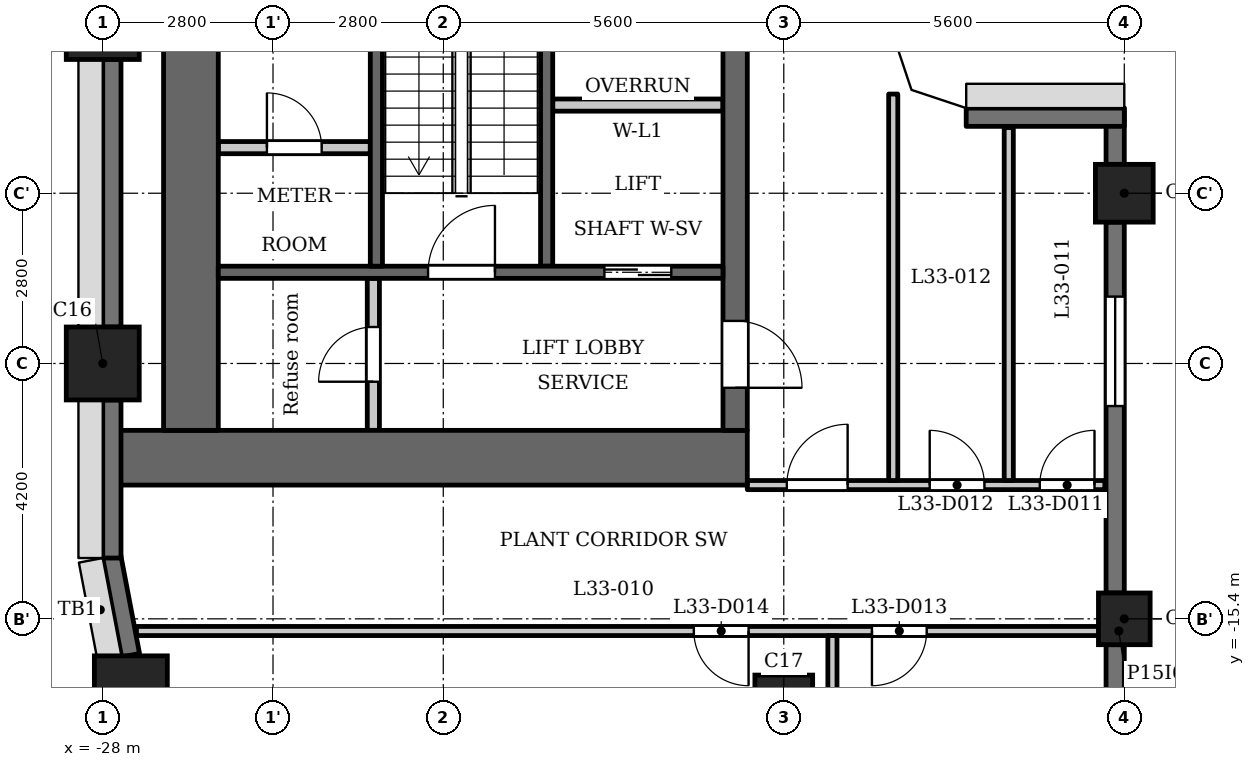
"""IFC4 building model, lengths in metres.
Left out: names, types, materials, properties, quantities, classifications, styles, units other than length and angle.
Written with IfcOpenShell. Run it as: python <this file> out.ifc"""

import sys

from ifc_helpers import new_model, si_unit, direction, frame, frame_2d, origin, origin_2d, place, context, subcontext, project, spatial, polyline, rectangle, outline, extrude, element, fill, save


model = new_model("IFC4")
c1 = context("Model", 3, precision=1e-05, world=origin(), true_north=direction((0.0, 1.0)))
c2 = subcontext(c1, "Body", "Model", "MODEL_VIEW")
j1 = project(units=[si_unit("LENGTHUNIT", "METRE"), si_unit("PLANEANGLEUNIT", "RADIAN")], contexts=[c1])
p1 = place(None, origin())
s1 = spatial("IfcSite", under=j1, at=p1, CompositionType="ELEMENT")
p2 = place(p1, origin())
s2 = spatial("IfcBuilding", under=s1, at=p2, CompositionType="ELEMENT")
p3 = place(p2, frame((0.0, 0.0, 130.7)))
s3 = spatial("IfcBuildingStorey", under=s2, at=p3, CompositionType="ELEMENT", Elevation=130.7)
for number, where, z_axis, x_axis in (
    (1, (-28.0, -5.6, 0.0), (0.0, 0.0, 1.0), (1.0, 0.0, 0.0)),
    (2, (-28.0, -11.2, 0.0), (0.0, 0.0, 1.0), (1.0, 0.0, 0.0)),
    (3, (-27.538, -16.609, 0.0), (0.0, 0.0, 1.0), (1.0, 0.0, 0.0)),
):
    element("IfcColumn", number, at=place(p3, frame(where, z_axis=z_axis, x_axis=x_axis)), inside=s3, PredefinedType="COLUMN", context=c2, shape_type="SweptSolid", body=[
        extrude(rectangle(XDim=1.2, YDim=1.2, at=origin_2d()), origin(), (0.0, 0.0, 1.0), 5.4),
    ])
for number, where, z_axis, x_axis in (
    (4, (-16.8, -16.8, 0.0), (0.0, 0.0, 1.0), (1.0, 0.0, 0.0)),
    (5, (-11.2, -8.4, 0.0), (0.0, 0.0, 1.0), (1.0, 0.0, 0.0)),
):
    element("IfcColumn", number, at=place(p3, frame(where, z_axis=z_axis, x_axis=x_axis)), inside=s3, PredefinedType="COLUMN", context=c2, shape_type="SweptSolid", body=[
        extrude(rectangle(XDim=0.95, YDim=0.95, at=origin_2d()), origin(), (0.0, 0.0, 1.0), 5.4),
    ])
p4 = place(p3, frame((-11.2, -15.4, 0.0), z_axis=(0.0, 0.0, 1.0), x_axis=(1.0, 0.0, 0.0)))
e6 = element("IfcColumn", 6, at=p4, inside=s3, PredefinedType="COLUMN", context=c2, shape_type="SweptSolid", body=[
    extrude(rectangle(XDim=0.85, YDim=0.85, at=origin_2d()), origin(), (0.0, 0.0, 1.0), 5.4),
])
p5 = place(p3, frame((-27.853, -14.372, 0.0), z_axis=(0.0, 0.0, 1.0), x_axis=(0.187349172861, -0.982293381546, 0.0)))
e7 = element("IfcWall", 7, at=p5, inside=s3, PredefinedType="SOLIDWALL", context=c2, shape_type="SweptSolid", body=[
    extrude(rectangle(XDim=1.656, YDim=0.3, at=frame_2d((0.828, 0.0))), origin(), (0.0, 0.0, 1.0), 4.3),
])
p6 = place(p3, frame((-11.35, -21.8, 0.0), z_axis=(0.0, 0.0, 1.0), x_axis=(0.0, 1.0, 0.0)))
e8 = element("IfcWall", 8, at=p6, inside=s3, PredefinedType="SOLIDWALL", context=c2, shape_type="SweptSolid", body=[
    extrude(rectangle(XDim=5.975, YDim=0.3, at=frame_2d((2.988, 0.0))), origin(), (0.0, 0.0, 1.0), 5.1),
])
p7 = place(p6, frame((2.087, 0.0, 0.9)))
e9 = element("IfcOpeningElement", 9, at=p7, cuts=e8, PredefinedType="OPENING", context=c2, shape_type="SweptSolid", body=[
    extrude(rectangle(XDim=1.8, YDim=1.5, at=frame_2d((0.9, 0.75))), frame((0.0, 0.16, 0.0), z_axis=(0.0, -1.0, 0.0), x_axis=(1.0, 0.0, 0.0)), (0.0, 0.0, 1.0), 0.32),
])
p8 = place(p3, frame((-11.35, -14.975, 0.0), z_axis=(0.0, 0.0, 1.0), x_axis=(0.0, 1.0, 0.0)))
e10 = element("IfcWall", 10, at=p8, inside=s3, PredefinedType="SOLIDWALL", context=c2, shape_type="SweptSolid", body=[
    extrude(rectangle(XDim=6.1, YDim=0.3, at=frame_2d((3.05, 0.0))), origin(), (0.0, 0.0, 1.0), 5.1),
])
p9 = place(p8, frame((3.075, 0.0, 0.9)))
e11 = element("IfcOpeningElement", 11, at=p9, cuts=e10, PredefinedType="OPENING", context=c2, shape_type="SweptSolid", body=[
    extrude(rectangle(XDim=1.8, YDim=1.5, at=frame_2d((0.9, 0.75))), frame((0.0, 0.16, 0.0), z_axis=(0.0, -1.0, 0.0), x_axis=(1.0, 0.0, 0.0)), (0.0, 0.0, 1.0), 0.32),
])
p10 = place(p3, frame((-11.35, -7.925, 0.0), z_axis=(0.0, 0.0, 1.0), x_axis=(0.0, 1.0, 0.0)))
e12 = element("IfcWall", 12, at=p10, inside=s3, PredefinedType="SOLIDWALL", context=c2, shape_type="SweptSolid", body=[
    extrude(rectangle(XDim=0.925, YDim=0.3, at=frame_2d((0.462, 0.0))), origin(), (0.0, 0.0, 1.0), 5.1),
])
p11 = place(p3, frame((-11.2, -7.15, 0.0), z_axis=(0.0, 0.0, 1.0), x_axis=(-1.0, 0.0, 0.0)))
e13 = element("IfcWall", 13, at=p11, inside=s3, PredefinedType="SOLIDWALL", context=c2, shape_type="SweptSolid", body=[
    extrude(rectangle(XDim=2.6, YDim=0.3, at=frame_2d((1.3, 0.0))), origin(), (0.0, 0.0, 1.0), 5.1),
])
p12 = place(p3, frame((-27.85, -6.2, 0.0), z_axis=(0.0, 0.0, 1.0), x_axis=(0.0, -1.0, 0.0)))
e14 = element("IfcWall", 14, at=p12, inside=s3, PredefinedType="SOLIDWALL", context=c2, shape_type="SweptSolid", body=[
    extrude(rectangle(XDim=4.4, YDim=0.3, at=frame_2d((2.2, 0.0))), origin(), (0.0, 0.0, 1.0), 4.3),
])
p13 = place(p3, frame((-27.85, -11.8, 0.0), z_axis=(0.0, 0.0, 1.0), x_axis=(0.0, -1.0, 0.0)))
e15 = element("IfcWall", 15, at=p13, inside=s3, PredefinedType="SOLIDWALL", context=c2, shape_type="SweptSolid", body=[
    extrude(rectangle(XDim=2.6, YDim=0.3, at=frame_2d((1.3, 0.0))), origin(), (0.0, 0.0, 1.0), 4.3),
])
p14 = place(p3, frame((-20.7, -9.6, 0.0), z_axis=(0.0, 0.0, 1.0), x_axis=(0.0, 1.0, 0.0)))
e16 = element("IfcWall", 16, at=p14, inside=s3, PredefinedType="SHEAR", context=c2, shape_type="SweptSolid", body=[
    extrude(rectangle(XDim=9.75, YDim=0.2, at=frame_2d((4.875, 0.0))), origin(), (0.0, 0.0, 1.0), 5.1),
])
p15 = place(p3, frame((-17.4, -12.75, 0.0), z_axis=(0.0, 0.0, 1.0), x_axis=(-1.0, 0.0, 0.0)))
e17 = element("IfcWall", 17, at=p15, inside=s3, PredefinedType="SHEAR", context=c2, shape_type="SweptSolid", body=[
    extrude(rectangle(XDim=10.4, YDim=0.9, at=frame_2d((5.2, 0.0))), origin(), (0.0, 0.0, 1.0), 5.1),
])
p16 = place(p3, frame((-17.6, -12.3, 0.0), z_axis=(0.0, 0.0, 1.0), x_axis=(0.0, 1.0, 0.0)))
e18 = element("IfcWall", 18, at=p16, inside=s3, PredefinedType="SHEAR", context=c2, shape_type="SweptSolid", body=[
    extrude(rectangle(XDim=24.6, YDim=0.4, at=frame_2d((12.3, 0.0))), origin(), (0.0, 0.0, 1.0), 5.1),
])
p17 = place(p16, frame((15.45, 0.0, 0.0)))
e19 = element("IfcOpeningElement", 19, at=p17, cuts=e18, PredefinedType="OPENING", context=c2, shape_type="SweptSolid", body=[
    extrude(rectangle(XDim=1.1, YDim=2.1, at=frame_2d((0.55, 1.05))), frame((0.0, 0.21, 0.0), z_axis=(0.0, -1.0, 0.0), x_axis=(1.0, 0.0, 0.0)), (0.0, 0.0, 1.0), 0.42),
])
p18 = place(p16, frame((17.85, 0.0, 0.0)))
e20 = element("IfcOpeningElement", 20, at=p18, cuts=e18, PredefinedType="OPENING", context=c2, shape_type="SweptSolid", body=[
    extrude(rectangle(XDim=1.1, YDim=2.1, at=frame_2d((0.55, 1.05))), frame((0.0, 0.21, 0.0), z_axis=(0.0, -1.0, 0.0), x_axis=(1.0, 0.0, 0.0)), (0.0, 0.0, 1.0), 0.42),
])
p19 = place(p16, frame((22.8, 0.0, 0.0)))
e21 = element("IfcOpeningElement", 21, at=p19, cuts=e18, PredefinedType="OPENING", context=c2, shape_type="SweptSolid", body=[
    extrude(rectangle(XDim=1.1, YDim=2.1, at=frame_2d((0.55, 1.05))), frame((0.0, 0.21, 0.0), z_axis=(0.0, -1.0, 0.0), x_axis=(1.0, 0.0, 0.0)), (0.0, 0.0, 1.0), 0.42),
])
p20 = place(p16, frame((0.7, 0.0, 0.0)))
e22 = element("IfcOpeningElement", 22, at=p20, cuts=e18, PredefinedType="OPENING", context=c2, shape_type="SweptSolid", body=[
    extrude(rectangle(XDim=1.1, YDim=2.1, at=frame_2d((0.55, 1.05))), frame((0.0, 0.21, 0.0), z_axis=(0.0, -1.0, 0.0), x_axis=(1.0, 0.0, 0.0)), (0.0, 0.0, 1.0), 0.42),
])
p21 = place(p16, frame((12.775, 0.0, 0.0)))
e23 = element("IfcOpeningElement", 23, at=p21, cuts=e18, PredefinedType="OPENING", context=c2, shape_type="SweptSolid", body=[
    extrude(rectangle(XDim=1.8, YDim=2.1, at=frame_2d((0.9, 1.05))), frame((0.0, 0.21, 0.0), z_axis=(0.0, -1.0, 0.0), x_axis=(1.0, 0.0, 0.0)), (0.0, 0.0, 1.0), 0.42),
])
p22 = place(p3, frame((-26.55, -12.3, 0.0), z_axis=(0.0, 0.0, 1.0), x_axis=(0.0, 1.0, 0.0)))
e24 = element("IfcWall", 24, at=p22, inside=s3, PredefinedType="SHEAR", context=c2, shape_type="SweptSolid", body=[
    extrude(rectangle(XDim=24.6, YDim=0.9, at=frame_2d((12.3, 0.0))), origin(), (0.0, 0.0, 1.0), 5.1),
])
p23 = place(p3, frame((-23.55, -12.3, 0.0), z_axis=(0.0, 0.0, 1.0), x_axis=(0.0, 1.0, 0.0)))
e25 = element("IfcWall", 25, at=p23, inside=s3, PredefinedType="PARTITIONING", context=c2, shape_type="SweptSolid", body=[
    extrude(rectangle(XDim=2.5, YDim=0.2, at=frame_2d((1.25, 0.0))), origin(), (0.0, 0.0, 1.0), 5.1),
])
p24 = place(p23, frame((0.8, 0.0, 0.0)))
e26 = element("IfcOpeningElement", 26, at=p24, cuts=e25, PredefinedType="OPENING", context=c2, shape_type="SweptSolid", body=[
    extrude(rectangle(XDim=0.9, YDim=2.1, at=frame_2d((0.45, 1.05))), frame((0.0, 0.11, 0.0), z_axis=(0.0, -1.0, 0.0), x_axis=(1.0, 0.0, 0.0)), (0.0, 0.0, 1.0), 0.22),
])
p25 = place(p3, frame((-23.6, -7.65, 0.0), z_axis=(0.0, 0.0, 1.0), x_axis=(-1.0, 0.0, 0.0)))
e27 = element("IfcWall", 27, at=p25, inside=s3, PredefinedType="PARTITIONING", context=c2, shape_type="SweptSolid", body=[
    extrude(rectangle(XDim=2.5, YDim=0.2, at=frame_2d((1.25, 0.0))), origin(), (0.0, 0.0, 1.0), 5.1),
])
p26 = place(p25, frame((0.8, 0.0, 0.0)))
e28 = element("IfcOpeningElement", 28, at=p26, cuts=e27, PredefinedType="OPENING", context=c2, shape_type="SweptSolid", body=[
    extrude(rectangle(XDim=0.9, YDim=2.1, at=frame_2d((0.45, 1.05))), frame((0.0, 0.11, 0.0), z_axis=(0.0, -1.0, 0.0), x_axis=(1.0, 0.0, 0.0)), (0.0, 0.0, 1.0), 0.22),
])
p27 = place(p3, frame((-17.8, -9.7, 0.0), z_axis=(0.0, 0.0, 1.0), x_axis=(-1.0, 0.0, 0.0)))
e29 = element("IfcWall", 29, at=p27, inside=s3, PredefinedType="SHEAR", context=c2, shape_type="SweptSolid", body=[
    extrude(rectangle(XDim=8.3, YDim=0.2, at=frame_2d((4.15, 0.0))), origin(), (0.0, 0.0, 1.0), 5.1),
])
p28 = place(p27, frame((0.85, 0.0, 0.0)))
e30 = element("IfcOpeningElement", 30, at=p28, cuts=e29, PredefinedType="OPENING", context=c2, shape_type="SweptSolid", body=[
    extrude(rectangle(XDim=1.1, YDim=2.1, at=frame_2d((0.55, 1.05))), frame((0.0, 0.11, 0.0), z_axis=(0.0, -1.0, 0.0), x_axis=(1.0, 0.0, 0.0)), (0.0, 0.0, 1.0), 0.22),
])
p29 = place(p27, frame((3.75, 0.0, 0.0)))
e31 = element("IfcOpeningElement", 31, at=p29, cuts=e29, PredefinedType="OPENING", context=c2, shape_type="SweptSolid", body=[
    extrude(rectangle(XDim=1.1, YDim=2.1, at=frame_2d((0.55, 1.05))), frame((0.0, 0.11, 0.0), z_axis=(0.0, -1.0, 0.0), x_axis=(1.0, 0.0, 0.0)), (0.0, 0.0, 1.0), 0.22),
])
p30 = place(p3, frame((-17.8, -6.95, 0.0), z_axis=(0.0, 0.0, 1.0), x_axis=(-1.0, 0.0, 0.0)))
e32 = element("IfcWall", 32, at=p30, inside=s3, PredefinedType="PARTITIONING", context=c2, shape_type="SweptSolid", body=[
    extrude(rectangle(XDim=2.8, YDim=0.2, at=frame_2d((1.4, 0.0))), origin(), (0.0, 0.0, 1.0), 5.1),
])
p31 = place(p3, frame((-23.5, -9.6, 0.0), z_axis=(0.0, 0.0, 1.0), x_axis=(0.0, 1.0, 0.0)))
e33 = element("IfcWall", 33, at=p31, inside=s3, PredefinedType="SHEAR", context=c2, shape_type="SweptSolid", body=[
    extrude(rectangle(XDim=6.9, YDim=0.2, at=frame_2d((3.45, 0.0))), origin(), (0.0, 0.0, 1.0), 5.1),
])
p32 = place(p3, frame((-27.446, -15.6, 0.0), z_axis=(0.0, 0.0, 1.0), x_axis=(1.0, 0.0, 0.0)))
e34 = element("IfcWall", 34, at=p32, inside=s3, PredefinedType="PARTITIONING", context=c2, shape_type="SweptSolid", body=[
    extrude(rectangle(XDim=16.156, YDim=0.15, at=frame_2d((8.078, 0.0))), origin(), (0.0, 0.0, 1.0), 5.1),
])
p33 = place(p32, frame((12.096, 0.0, 0.0)))
e35 = element("IfcOpeningElement", 35, at=p33, cuts=e34, PredefinedType="OPENING", context=c2, shape_type="SweptSolid", body=[
    extrude(rectangle(XDim=0.9, YDim=2.1, at=frame_2d((0.45, 1.05))), frame((0.0, 0.085, 0.0), z_axis=(0.0, -1.0, 0.0), x_axis=(1.0, 0.0, 0.0)), (0.0, 0.0, 1.0), 0.17),
])
p34 = place(p32, frame((9.167, 0.0, 0.0)))
e36 = element("IfcOpeningElement", 36, at=p34, cuts=e34, PredefinedType="OPENING", context=c2, shape_type="SweptSolid", body=[
    extrude(rectangle(XDim=0.9, YDim=2.1, at=frame_2d((0.45, 1.05))), frame((0.0, 0.085, 0.0), z_axis=(0.0, -1.0, 0.0), x_axis=(1.0, 0.0, 0.0)), (0.0, 0.0, 1.0), 0.17),
])
p35 = place(p3, frame((-17.4, -13.2, 0.0), z_axis=(0.0, 0.0, 1.0), x_axis=(1.0, 0.0, 0.0)))
e37 = element("IfcWall", 37, at=p35, inside=s3, PredefinedType="PARTITIONING", context=c2, shape_type="SweptSolid", body=[
    extrude(rectangle(XDim=5.88, YDim=0.15, at=frame_2d((2.94, 0.0))), origin(), (0.0, 0.0, 1.0), 5.1),
])
p36 = place(p35, frame((0.65, 0.0, 0.0)))
e38 = element("IfcOpeningElement", 38, at=p36, cuts=e37, PredefinedType="OPENING", context=c2, shape_type="SweptSolid", body=[
    extrude(rectangle(XDim=1.0, YDim=2.1, at=frame_2d((0.5, 1.05))), frame((0.0, 0.085, 0.0), z_axis=(0.0, -1.0, 0.0), x_axis=(1.0, 0.0, 0.0)), (0.0, 0.0, 1.0), 0.17),
])
p37 = place(p35, frame((4.81, 0.0, 0.0)))
e39 = element("IfcOpeningElement", 39, at=p37, cuts=e37, PredefinedType="OPENING", context=c2, shape_type="SweptSolid", body=[
    extrude(rectangle(XDim=0.9, YDim=2.1, at=frame_2d((0.45, 1.05))), frame((0.0, 0.085, 0.0), z_axis=(0.0, -1.0, 0.0), x_axis=(1.0, 0.0, 0.0)), (0.0, 0.0, 1.0), 0.17),
])
p38 = place(p35, frame((3.0, 0.0, 0.0)))
e40 = element("IfcOpeningElement", 40, at=p38, cuts=e37, PredefinedType="OPENING", context=c2, shape_type="SweptSolid", body=[
    extrude(rectangle(XDim=0.9, YDim=2.1, at=frame_2d((0.45, 1.05))), frame((0.0, 0.085, 0.0), z_axis=(0.0, -1.0, 0.0), x_axis=(1.0, 0.0, 0.0)), (0.0, 0.0, 1.0), 0.17),
])
p39 = place(p3, frame((-16.0, -22.08, 0.0), z_axis=(0.0, 0.0, 1.0), x_axis=(0.0, 1.0, 0.0)))
e41 = element("IfcWall", 41, at=p39, inside=s3, PredefinedType="PARTITIONING", context=c2, shape_type="SweptSolid", body=[
    extrude(rectangle(XDim=6.405, YDim=0.15, at=frame_2d((3.203, 0.0))), origin(), (0.0, 0.0, 1.0), 5.1),
])
p40 = place(p3, frame((-15.0, -13.125, 0.0), z_axis=(0.0, 0.0, 1.0), x_axis=(0.0, 1.0, 0.0)))
e42 = element("IfcWall", 42, at=p40, inside=s3, PredefinedType="PARTITIONING", context=c2, shape_type="SweptSolid", body=[
    extrude(rectangle(XDim=6.356, YDim=0.15, at=frame_2d((3.178, 0.0))), origin(), (0.0, 0.0, 1.0), 5.1),
])
p41 = place(p3, frame((-13.1, -13.125, 0.0), z_axis=(0.0, 0.0, 1.0), x_axis=(0.0, 1.0, 0.0)))
e43 = element("IfcWall", 43, at=p41, inside=s3, PredefinedType="PARTITIONING", context=c2, shape_type="SweptSolid", body=[
    extrude(rectangle(XDim=5.805, YDim=0.15, at=frame_2d((2.902, 0.0))), origin(), (0.0, 0.0, 1.0), 5.1),
])
p42 = place(p3, origin())
e44 = element("IfcWall", 44, at=p42, inside=s3, PredefinedType="SOLIDWALL", context=c2, shape_type="SweptSolid", body=[
    extrude(outline(polyline([(-13.8, -7.0), (-14.7, -6.7), (-15.0, -5.8), (-15.3, -5.8), (-15.3, -5.849), (-14.937, -6.937), (-13.849, -7.3), (-13.8, -7.3), (-13.8, -7.0)])), origin(), (0.0, 0.0, 1.0), 5.1),
])
p43 = place(p28, origin())
e45 = element("IfcDoor", 45, at=p43, inside=s3, OperationType="DOUBLE_DOOR_SLIDING", PredefinedType="DOOR", context=c2, shape_type="SweptSolid", body=[
    extrude(rectangle(XDim=1.1, YDim=2.1, at=frame_2d((0.55, 1.05))), frame((0.0, 0.025, 0.0), z_axis=(0.0, -1.0, 0.0), x_axis=(1.0, 0.0, 0.0)), (0.0, 0.0, 1.0), 0.05),
])
fill(e30, e45)
p44 = place(p20, origin())
e46 = element("IfcDoor", 46, at=p44, inside=s3, OperationType="SINGLE_SWING_LEFT", PredefinedType="DOOR", context=c2, shape_type="SweptSolid", body=[
    extrude(rectangle(XDim=1.1, YDim=2.1, at=frame_2d((0.55, 1.05))), frame((0.0, 0.025, 0.0), z_axis=(0.0, -1.0, 0.0), x_axis=(1.0, 0.0, 0.0)), (0.0, 0.0, 1.0), 0.05),
])
fill(e22, e46)
p45 = place(p24, origin())
e47 = element("IfcDoor", 47, at=p45, inside=s3, OperationType="SINGLE_SWING_RIGHT", PredefinedType="DOOR", context=c2, shape_type="SweptSolid", body=[
    extrude(rectangle(XDim=0.9, YDim=2.1, at=frame_2d((0.45, 1.05))), frame((0.0, 0.025, 0.0), z_axis=(0.0, -1.0, 0.0), x_axis=(1.0, 0.0, 0.0)), (0.0, 0.0, 1.0), 0.05),
])
fill(e26, e47)
p46 = place(p29, origin())
e48 = element("IfcDoor", 48, at=p46, inside=s3, OperationType="SINGLE_SWING_LEFT", PredefinedType="DOOR", context=c2, shape_type="SweptSolid", body=[
    extrude(rectangle(XDim=1.1, YDim=2.1, at=frame_2d((0.55, 1.05))), frame((0.0, 0.025, 0.0), z_axis=(0.0, -1.0, 0.0), x_axis=(1.0, 0.0, 0.0)), (0.0, 0.0, 1.0), 0.05),
])
fill(e31, e48)
p47 = place(p26, origin())
e49 = element("IfcDoor", 49, at=p47, inside=s3, OperationType="SINGLE_SWING_RIGHT", PredefinedType="DOOR", context=c2, shape_type="SweptSolid", body=[
    extrude(rectangle(XDim=0.9, YDim=2.1, at=frame_2d((0.45, 1.05))), frame((0.0, 0.025, 0.0), z_axis=(0.0, -1.0, 0.0), x_axis=(1.0, 0.0, 0.0)), (0.0, 0.0, 1.0), 0.05),
])
fill(e28, e49)
p48 = place(p36, origin())
e50 = element("IfcDoor", 50, at=p48, inside=s3, OperationType="SINGLE_SWING_LEFT", PredefinedType="DOOR", context=c2, shape_type="SweptSolid", body=[
    extrude(rectangle(XDim=1.0, YDim=2.1, at=frame_2d((0.5, 1.05))), frame((0.0, 0.025, 0.0), z_axis=(0.0, -1.0, 0.0), x_axis=(1.0, 0.0, 0.0)), (0.0, 0.0, 1.0), 0.05),
])
fill(e38, e50)
p49 = place(p37, origin())
e51 = element("IfcDoor", 51, at=p49, inside=s3, OperationType="SINGLE_SWING_LEFT", PredefinedType="DOOR", context=c2, shape_type="SweptSolid", body=[
    extrude(rectangle(XDim=0.9, YDim=2.1, at=frame_2d((0.45, 1.05))), frame((0.0, 0.025, 0.0), z_axis=(0.0, -1.0, 0.0), x_axis=(1.0, 0.0, 0.0)), (0.0, 0.0, 1.0), 0.05),
])
fill(e39, e51)
p50 = place(p38, origin())
e52 = element("IfcDoor", 52, at=p50, inside=s3, OperationType="SINGLE_SWING_RIGHT", PredefinedType="DOOR", context=c2, shape_type="SweptSolid", body=[
    extrude(rectangle(XDim=0.9, YDim=2.1, at=frame_2d((0.45, 1.05))), frame((0.0, 0.025, 0.0), z_axis=(0.0, -1.0, 0.0), x_axis=(1.0, 0.0, 0.0)), (0.0, 0.0, 1.0), 0.05),
])
fill(e40, e52)
p51 = place(p33, origin())
e53 = element("IfcDoor", 53, at=p51, inside=s3, OperationType="SINGLE_SWING_LEFT", PredefinedType="DOOR", context=c2, shape_type="SweptSolid", body=[
    extrude(rectangle(XDim=0.9, YDim=2.1, at=frame_2d((0.45, 1.05))), frame((0.0, 0.025, 0.0), z_axis=(0.0, -1.0, 0.0), x_axis=(1.0, 0.0, 0.0)), (0.0, 0.0, 1.0), 0.05),
])
fill(e35, e53)
p52 = place(p34, origin())
e54 = element("IfcDoor", 54, at=p52, inside=s3, OperationType="SINGLE_SWING_RIGHT", PredefinedType="DOOR", context=c2, shape_type="SweptSolid", body=[
    extrude(rectangle(XDim=0.9, YDim=2.1, at=frame_2d((0.45, 1.05))), frame((0.0, 0.025, 0.0), z_axis=(0.0, -1.0, 0.0), x_axis=(1.0, 0.0, 0.0)), (0.0, 0.0, 1.0), 0.05),
])
fill(e36, e54)
p53 = place(p9, origin())
e55 = element("IfcWindow", 55, at=p53, inside=s3, PartitioningType="SINGLE_PANEL", PredefinedType="WINDOW", context=c2, shape_type="SweptSolid", body=[
    extrude(rectangle(XDim=1.8, YDim=1.5, at=frame_2d((0.9, 0.75))), frame((0.0, 0.03, 0.0), z_axis=(0.0, -1.0, 0.0), x_axis=(1.0, 0.0, 0.0)), (0.0, 0.0, 1.0), 0.06),
])
fill(e11, e55)
save(model, sys.argv[1])
